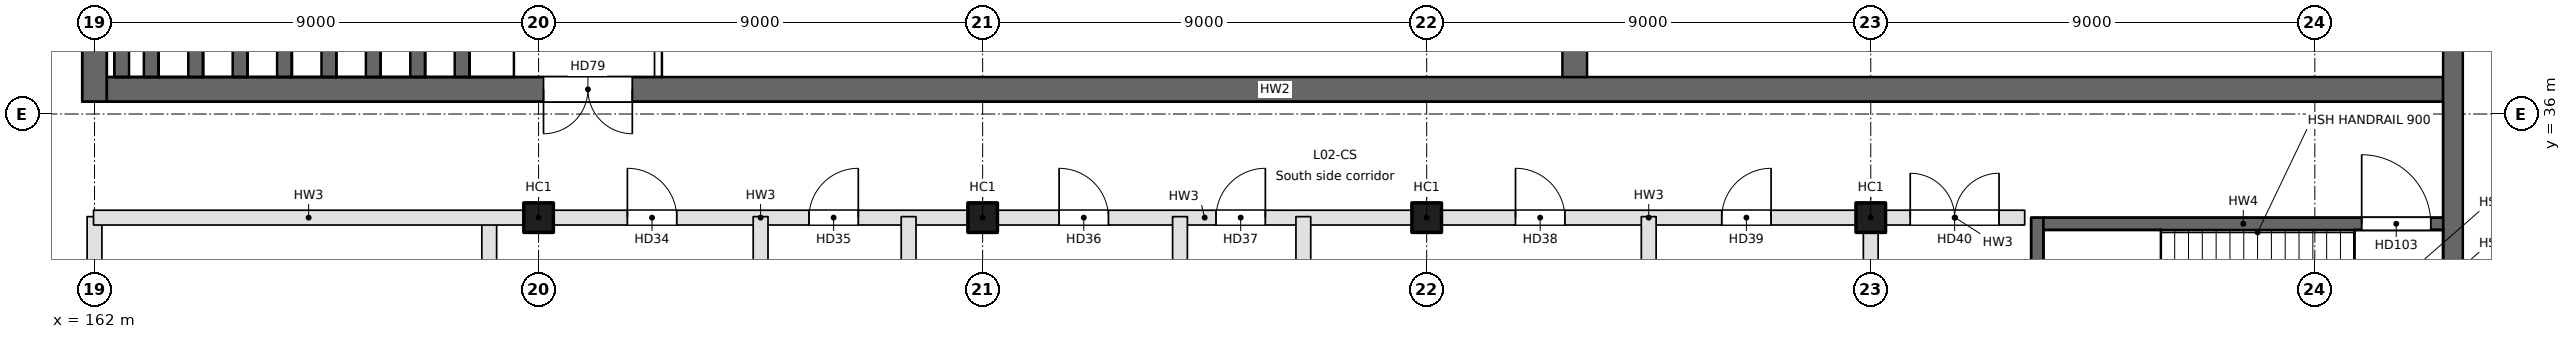
"""IFC4 building model, lengths in metres.
Left out: names, types, materials, properties, quantities, classifications, styles, units other than length and angle.
Written with IfcOpenShell. Run it as: python <this file> out.ifc"""

import sys

from ifc_helpers import new_model, si_unit, direction, frame, frame_2d, origin, origin_2d, place, context, subcontext, project, spatial, rectangle, extrude, element, fill, save


model = new_model("IFC4")
c1 = context("Model", 3, precision=1e-05, world=origin(), true_north=direction((0.0, 1.0)))
c2 = subcontext(c1, "Body", "Model", "MODEL_VIEW")
j1 = project(units=[si_unit("LENGTHUNIT", "METRE"), si_unit("PLANEANGLEUNIT", "RADIAN")], contexts=[c1])
p1 = place(None, origin())
s1 = spatial("IfcSite", under=j1, at=p1, CompositionType="ELEMENT")
p2 = place(p1, origin())
s2 = spatial("IfcBuilding", under=s1, at=p2, CompositionType="ELEMENT")
p3 = place(p2, frame((0.0, 0.0, 11.4)))
s3 = spatial("IfcBuildingStorey", under=s2, at=p3, CompositionType="ELEMENT", Elevation=11.4)
for number, where, z_axis, x_axis in (
    (1, (171.0, 33.9, 0.0), (0.0, 0.0, 1.0), (1.0, 0.0, 0.0)),
    (2, (180.0, 33.9, 0.0), (0.0, 0.0, 1.0), (1.0, 0.0, 0.0)),
    (3, (189.0, 33.9, 0.0), (0.0, 0.0, 1.0), (1.0, 0.0, 0.0)),
    (4, (198.0, 33.9, 0.0), (0.0, 0.0, 1.0), (1.0, 0.0, 0.0)),
):
    element("IfcColumn", number, at=place(p3, frame(where, z_axis=z_axis, x_axis=x_axis)), inside=s3, PredefinedType="COLUMN", context=c2, shape_type="SweptSolid", body=[
        extrude(rectangle(XDim=0.6, YDim=0.6, at=origin_2d()), origin(), (0.0, 0.0, 1.0), 5.4),
    ])
p4 = place(p3, frame((162.0, 36.25, -0.35), z_axis=(0.0, 0.0, 1.0), x_axis=(0.0, 1.0, 0.0)))
e5 = element("IfcWall", 5, at=p4, inside=s3, PredefinedType="SOLIDWALL", context=c2, shape_type="SweptSolid", body=[
    extrude(rectangle(XDim=26.5, YDim=0.5, at=frame_2d((13.25, 0.0))), origin(), (0.0, 0.0, 1.0), 5.4),
])
p5 = place(p3, frame((209.6, 36.5, -0.35), z_axis=(0.0, 0.0, 1.0), x_axis=(-1.0, 0.0, 0.0)))
e6 = element("IfcWall", 6, at=p5, inside=s3, PredefinedType="SOLIDWALL", context=c2, shape_type="SweptSolid", body=[
    extrude(rectangle(XDim=47.35, YDim=0.5, at=frame_2d((23.675, 0.0))), origin(), (0.0, 0.0, 1.0), 5.4),
])
p6 = place(p5, frame((36.7, 0.0, 0.35)))
e7 = element("IfcOpeningElement", 7, at=p6, cuts=e6, PredefinedType="OPENING", context=c2, shape_type="SweptSolid", body=[
    extrude(rectangle(XDim=1.8, YDim=2.4, at=frame_2d((0.9, 1.2))), frame((0.0, 0.25, 0.0), z_axis=(0.0, -1.0, 0.0), x_axis=(1.0, 0.0, 0.0)), (0.0, 0.0, 1.0), 0.5),
])
p7 = place(p3, frame((192.0, 36.75, -0.35), z_axis=(0.0, 0.0, 1.0), x_axis=(0.0, 1.0, 0.0)))
e8 = element("IfcWall", 8, at=p7, inside=s3, PredefinedType="SOLIDWALL", context=c2, shape_type="SweptSolid", body=[
    extrude(rectangle(XDim=5.75, YDim=0.5, at=frame_2d((2.875, 0.0))), origin(), (0.0, 0.0, 1.0), 5.4),
])
p8 = place(p3, frame((209.8, 76.5, -0.35), z_axis=(0.0, 0.0, 1.0), x_axis=(0.0, -1.0, 0.0)))
e9 = element("IfcWall", 9, at=p8, inside=s3, PredefinedType="SOLIDWALL", context=c2, shape_type="SweptSolid", body=[
    extrude(rectangle(XDim=54.0, YDim=0.4, at=frame_2d((27.0, 0.0))), origin(), (0.0, 0.0, 1.0), 5.4),
])
p9 = place(p8, frame((49.3, 0.0, 1.25)))
e10 = element("IfcOpeningElement", 10, at=p9, cuts=e9, PredefinedType="OPENING", context=c2, shape_type="SweptSolid", body=[
    extrude(rectangle(XDim=2.4, YDim=1.8, at=frame_2d((1.2, 0.9))), frame((0.0, 0.2, 0.0), z_axis=(0.0, -1.0, 0.0), x_axis=(1.0, 0.0, 0.0)), (0.0, 0.0, 1.0), 0.4),
])
p10 = place(p8, frame((2.3, 0.0, 1.25)))
e11 = element("IfcOpeningElement", 11, at=p10, cuts=e9, PredefinedType="OPENING", context=c2, shape_type="SweptSolid", body=[
    extrude(rectangle(XDim=2.4, YDim=1.8, at=frame_2d((1.2, 0.9))), frame((0.0, 0.2, 0.0), z_axis=(0.0, -1.0, 0.0), x_axis=(1.0, 0.0, 0.0)), (0.0, 0.0, 1.0), 0.4),
])
p11 = place(p3, frame((169.45, 36.75, 0.0), z_axis=(0.0, 0.0, 1.0), x_axis=(0.0, 1.0, 0.0)))
e12 = element("IfcWall", 12, at=p11, inside=s3, PredefinedType="SOLIDWALL", context=c2, shape_type="SweptSolid", body=[
    extrude(rectangle(XDim=25.5, YDim=0.3, at=frame_2d((12.75, 0.0))), origin(), (0.0, 0.0, 1.0), 0.2),
])
p12 = place(p3, frame((168.55, 36.75, 0.0), z_axis=(0.0, 0.0, 1.0), x_axis=(0.0, 1.0, 0.0)))
e13 = element("IfcWall", 13, at=p12, inside=s3, PredefinedType="SOLIDWALL", context=c2, shape_type="SweptSolid", body=[
    extrude(rectangle(XDim=25.5, YDim=0.3, at=frame_2d((12.75, 0.0))), origin(), (0.0, 0.0, 1.0), 0.4),
])
p13 = place(p3, frame((167.65, 36.75, 0.0), z_axis=(0.0, 0.0, 1.0), x_axis=(0.0, 1.0, 0.0)))
e14 = element("IfcWall", 14, at=p13, inside=s3, PredefinedType="SOLIDWALL", context=c2, shape_type="SweptSolid", body=[
    extrude(rectangle(XDim=25.5, YDim=0.3, at=frame_2d((12.75, 0.0))), origin(), (0.0, 0.0, 1.0), 0.6),
])
p14 = place(p3, frame((166.75, 36.75, 0.0), z_axis=(0.0, 0.0, 1.0), x_axis=(0.0, 1.0, 0.0)))
e15 = element("IfcWall", 15, at=p14, inside=s3, PredefinedType="SOLIDWALL", context=c2, shape_type="SweptSolid", body=[
    extrude(rectangle(XDim=25.5, YDim=0.3, at=frame_2d((12.75, 0.0))), origin(), (0.0, 0.0, 1.0), 0.8),
])
p15 = place(p3, frame((165.85, 36.75, 0.0), z_axis=(0.0, 0.0, 1.0), x_axis=(0.0, 1.0, 0.0)))
e16 = element("IfcWall", 16, at=p15, inside=s3, PredefinedType="SOLIDWALL", context=c2, shape_type="SweptSolid", body=[
    extrude(rectangle(XDim=25.5, YDim=0.3, at=frame_2d((12.75, 0.0))), origin(), (0.0, 0.0, 1.0), 1.0),
])
p16 = place(p3, frame((164.95, 36.75, 0.0), z_axis=(0.0, 0.0, 1.0), x_axis=(0.0, 1.0, 0.0)))
e17 = element("IfcWall", 17, at=p16, inside=s3, PredefinedType="SOLIDWALL", context=c2, shape_type="SweptSolid", body=[
    extrude(rectangle(XDim=25.5, YDim=0.3, at=frame_2d((12.75, 0.0))), origin(), (0.0, 0.0, 1.0), 1.2),
])
p17 = place(p3, frame((164.05, 36.75, 0.0), z_axis=(0.0, 0.0, 1.0), x_axis=(0.0, 1.0, 0.0)))
e18 = element("IfcWall", 18, at=p17, inside=s3, PredefinedType="SOLIDWALL", context=c2, shape_type="SweptSolid", body=[
    extrude(rectangle(XDim=25.5, YDim=0.3, at=frame_2d((12.75, 0.0))), origin(), (0.0, 0.0, 1.0), 1.4),
])
for number, where, z_axis, x_axis in (
    (19, (163.15, 36.75, 0.0), (0.0, 0.0, 1.0), (0.0, 1.0, 0.0)),
    (20, (162.55, 36.75, 0.0), (0.0, 0.0, 1.0), (0.0, 1.0, 0.0)),
):
    element("IfcWall", number, at=place(p3, frame(where, z_axis=z_axis, x_axis=x_axis)), inside=s3, PredefinedType="SOLIDWALL", context=c2, shape_type="SweptSolid", body=[
        extrude(rectangle(XDim=25.5, YDim=0.3, at=frame_2d((12.75, 0.0))), origin(), (0.0, 0.0, 1.0), 1.6),
    ])
p18 = place(p3, frame((162.0, 22.73, 0.0), z_axis=(0.0, 0.0, 1.0), x_axis=(0.0, 1.0, 0.0)))
e21 = element("IfcWall", 21, at=p18, inside=s3, PredefinedType="PARTITIONING", context=c2, shape_type="SweptSolid", body=[
    extrude(rectangle(XDim=11.19, YDim=0.3, at=frame_2d((5.595, 0.0))), origin(), (0.0, 0.0, 1.0), 5.05),
])
p19 = place(p18, frame((4.75, 0.0, 0.0)))
e22 = element("IfcOpeningElement", 22, at=p19, cuts=e21, PredefinedType="OPENING", context=c2, shape_type="SweptSolid", body=[
    extrude(rectangle(XDim=1.8, YDim=2.1, at=frame_2d((0.9, 1.05))), frame((0.0, 0.15, 0.0), z_axis=(0.0, -1.0, 0.0), x_axis=(1.0, 0.0, 0.0)), (0.0, 0.0, 1.0), 0.3),
])
p20 = place(p3, frame((170.0, 22.73, 0.0), z_axis=(0.0, 0.0, 1.0), x_axis=(0.0, 1.0, 0.0)))
e23 = element("IfcWall", 23, at=p20, inside=s3, PredefinedType="PARTITIONING", context=c2, shape_type="SweptSolid", body=[
    extrude(rectangle(XDim=11.19, YDim=0.3, at=frame_2d((5.595, 0.0))), origin(), (0.0, 0.0, 1.0), 5.05),
])
p21 = place(p3, frame((161.98, 33.9, 0.0), z_axis=(0.0, 0.0, 1.0), x_axis=(1.0, 0.0, 0.0)))
e24 = element("IfcWall", 24, at=p21, inside=s3, PredefinedType="PARTITIONING", context=c2, shape_type="SweptSolid", body=[
    extrude(rectangle(XDim=8.72, YDim=0.3, at=frame_2d((4.36, 0.0))), origin(), (0.0, 0.0, 1.0), 5.05),
])
p22 = place(p3, frame((171.3, 33.9, 0.0), z_axis=(0.0, 0.0, 1.0), x_axis=(1.0, 0.0, 0.0)))
e25 = element("IfcWall", 25, at=p22, inside=s3, PredefinedType="PARTITIONING", context=c2, shape_type="SweptSolid", body=[
    extrude(rectangle(XDim=8.4, YDim=0.3, at=frame_2d((4.2, 0.0))), origin(), (0.0, 0.0, 1.0), 5.05),
])
p23 = place(p22, frame((1.5, 0.0, 0.0)))
e26 = element("IfcOpeningElement", 26, at=p23, cuts=e25, PredefinedType="OPENING", context=c2, shape_type="SweptSolid", body=[
    extrude(rectangle(XDim=1.0, YDim=2.1, at=frame_2d((0.5, 1.05))), frame((0.0, 0.15, 0.0), z_axis=(0.0, -1.0, 0.0), x_axis=(1.0, 0.0, 0.0)), (0.0, 0.0, 1.0), 0.3),
])
p24 = place(p22, frame((5.18, 0.0, 0.0)))
e27 = element("IfcOpeningElement", 27, at=p24, cuts=e25, PredefinedType="OPENING", context=c2, shape_type="SweptSolid", body=[
    extrude(rectangle(XDim=1.0, YDim=2.1, at=frame_2d((0.5, 1.05))), frame((0.0, 0.15, 0.0), z_axis=(0.0, -1.0, 0.0), x_axis=(1.0, 0.0, 0.0)), (0.0, 0.0, 1.0), 0.3),
])
p25 = place(p3, frame((180.3, 33.9, 0.0), z_axis=(0.0, 0.0, 1.0), x_axis=(1.0, 0.0, 0.0)))
e28 = element("IfcWall", 28, at=p25, inside=s3, PredefinedType="PARTITIONING", context=c2, shape_type="SweptSolid", body=[
    extrude(rectangle(XDim=8.4, YDim=0.3, at=frame_2d((4.2, 0.0))), origin(), (0.0, 0.0, 1.0), 5.05),
])
p26 = place(p25, frame((1.25, 0.0, 0.0)))
e29 = element("IfcOpeningElement", 29, at=p26, cuts=e28, PredefinedType="OPENING", context=c2, shape_type="SweptSolid", body=[
    extrude(rectangle(XDim=1.0, YDim=2.1, at=frame_2d((0.5, 1.05))), frame((0.0, 0.15, 0.0), z_axis=(0.0, -1.0, 0.0), x_axis=(1.0, 0.0, 0.0)), (0.0, 0.0, 1.0), 0.3),
])
p27 = place(p25, frame((4.43, 0.0, 0.0)))
e30 = element("IfcOpeningElement", 30, at=p27, cuts=e28, PredefinedType="OPENING", context=c2, shape_type="SweptSolid", body=[
    extrude(rectangle(XDim=1.0, YDim=2.1, at=frame_2d((0.5, 1.05))), frame((0.0, 0.15, 0.0), z_axis=(0.0, -1.0, 0.0), x_axis=(1.0, 0.0, 0.0)), (0.0, 0.0, 1.0), 0.3),
])
p28 = place(p3, frame((189.3, 33.9, 0.0), z_axis=(0.0, 0.0, 1.0), x_axis=(1.0, 0.0, 0.0)))
e31 = element("IfcWall", 31, at=p28, inside=s3, PredefinedType="PARTITIONING", context=c2, shape_type="SweptSolid", body=[
    extrude(rectangle(XDim=8.4, YDim=0.3, at=frame_2d((4.2, 0.0))), origin(), (0.0, 0.0, 1.0), 5.05),
])
p29 = place(p28, frame((1.5, 0.0, 0.0)))
e32 = element("IfcOpeningElement", 32, at=p29, cuts=e31, PredefinedType="OPENING", context=c2, shape_type="SweptSolid", body=[
    extrude(rectangle(XDim=1.0, YDim=2.1, at=frame_2d((0.5, 1.05))), frame((0.0, 0.15, 0.0), z_axis=(0.0, -1.0, 0.0), x_axis=(1.0, 0.0, 0.0)), (0.0, 0.0, 1.0), 0.3),
])
p30 = place(p28, frame((5.68, 0.0, 0.0)))
e33 = element("IfcOpeningElement", 33, at=p30, cuts=e31, PredefinedType="OPENING", context=c2, shape_type="SweptSolid", body=[
    extrude(rectangle(XDim=1.0, YDim=2.1, at=frame_2d((0.5, 1.05))), frame((0.0, 0.15, 0.0), z_axis=(0.0, -1.0, 0.0), x_axis=(1.0, 0.0, 0.0)), (0.0, 0.0, 1.0), 0.3),
])
p31 = place(p3, frame((198.3, 33.9, 0.0), z_axis=(0.0, 0.0, 1.0), x_axis=(1.0, 0.0, 0.0)))
e34 = element("IfcWall", 34, at=p31, inside=s3, PredefinedType="PARTITIONING", context=c2, shape_type="SweptSolid", body=[
    extrude(rectangle(XDim=2.82, YDim=0.3, at=frame_2d((1.41, 0.0))), origin(), (0.0, 0.0, 1.0), 5.05),
])
p32 = place(p31, frame((0.5, 0.0, 0.0)))
e35 = element("IfcOpeningElement", 35, at=p32, cuts=e34, PredefinedType="OPENING", context=c2, shape_type="SweptSolid", body=[
    extrude(rectangle(XDim=1.8, YDim=2.1, at=frame_2d((0.9, 1.05))), frame((0.0, 0.15, 0.0), z_axis=(0.0, -1.0, 0.0), x_axis=(1.0, 0.0, 0.0)), (0.0, 0.0, 1.0), 0.3),
])
for number, where, z_axis, x_axis in (
    (36, (175.5, 22.73, 0.0), (0.0, 0.0, 1.0), (0.0, 1.0, 0.0)),
    (37, (178.5, 22.73, 0.0), (0.0, 0.0, 1.0), (0.0, 1.0, 0.0)),
    (38, (184.0, 22.73, 0.0), (0.0, 0.0, 1.0), (0.0, 1.0, 0.0)),
    (39, (186.5, 22.73, 0.0), (0.0, 0.0, 1.0), (0.0, 1.0, 0.0)),
    (40, (193.5, 22.73, 0.0), (0.0, 0.0, 1.0), (0.0, 1.0, 0.0)),
):
    element("IfcWall", number, at=place(p3, frame(where, z_axis=z_axis, x_axis=x_axis)), inside=s3, PredefinedType="PARTITIONING", context=c2, shape_type="SweptSolid", body=[
        extrude(rectangle(XDim=11.19, YDim=0.3, at=frame_2d((5.595, 0.0))), origin(), (0.0, 0.0, 1.0), 5.05),
    ])
p33 = place(p3, frame((198.0, 22.73, 0.0), z_axis=(0.0, 0.0, 1.0), x_axis=(0.0, 1.0, 0.0)))
e41 = element("IfcWall", 41, at=p33, inside=s3, PredefinedType="PARTITIONING", context=c2, shape_type="SweptSolid", body=[
    extrude(rectangle(XDim=10.87, YDim=0.3, at=frame_2d((5.435, 0.0))), origin(), (0.0, 0.0, 1.0), 5.05),
])
p34 = place(p3, frame((201.375, 29.65, -0.35), z_axis=(0.0, 0.0, 1.0), x_axis=(0.0, 1.0, 0.0)))
e42 = element("IfcWall", 42, at=p34, inside=s3, PredefinedType="SOLIDWALL", context=c2, shape_type="SweptSolid", body=[
    extrude(rectangle(XDim=4.25, YDim=0.25, at=frame_2d((2.125, 0.0))), origin(), (0.0, 0.0, 1.0), 5.4),
])
p35 = place(p3, frame((201.5, 33.775, -0.35), z_axis=(0.0, 0.0, 1.0), x_axis=(1.0, 0.0, 0.0)))
e43 = element("IfcWall", 43, at=p35, inside=s3, PredefinedType="SOLIDWALL", context=c2, shape_type="SweptSolid", body=[
    extrude(rectangle(XDim=8.1, YDim=0.25, at=frame_2d((4.05, 0.0))), origin(), (0.0, 0.0, 1.0), 5.4),
])
p36 = place(p35, frame((6.45, 0.0, 0.35)))
e44 = element("IfcOpeningElement", 44, at=p36, cuts=e43, PredefinedType="OPENING", context=c2, shape_type="SweptSolid", body=[
    extrude(rectangle(XDim=1.4, YDim=2.1, at=frame_2d((0.7, 1.05))), frame((0.0, 0.125, 0.0), z_axis=(0.0, -1.0, 0.0), x_axis=(1.0, 0.0, 0.0)), (0.0, 0.0, 1.0), 0.25),
])
p37 = place(p23, origin())
e45 = element("IfcDoor", 45, at=p37, inside=s3, OperationType="SINGLE_SWING_LEFT", PredefinedType="DOOR", context=c2, shape_type="SweptSolid", body=[
    extrude(rectangle(XDim=1.0, YDim=2.1, at=frame_2d((0.5, 1.05))), frame((0.0, 0.025, 0.0), z_axis=(0.0, -1.0, 0.0), x_axis=(1.0, 0.0, 0.0)), (0.0, 0.0, 1.0), 0.05),
])
fill(e26, e45)
p38 = place(p24, origin())
e46 = element("IfcDoor", 46, at=p38, inside=s3, OperationType="SINGLE_SWING_RIGHT", PredefinedType="DOOR", context=c2, shape_type="SweptSolid", body=[
    extrude(rectangle(XDim=1.0, YDim=2.1, at=frame_2d((0.5, 1.05))), frame((0.0, 0.025, 0.0), z_axis=(0.0, -1.0, 0.0), x_axis=(1.0, 0.0, 0.0)), (0.0, 0.0, 1.0), 0.05),
])
fill(e27, e46)
p39 = place(p26, origin())
e47 = element("IfcDoor", 47, at=p39, inside=s3, OperationType="SINGLE_SWING_LEFT", PredefinedType="DOOR", context=c2, shape_type="SweptSolid", body=[
    extrude(rectangle(XDim=1.0, YDim=2.1, at=frame_2d((0.5, 1.05))), frame((0.0, 0.025, 0.0), z_axis=(0.0, -1.0, 0.0), x_axis=(1.0, 0.0, 0.0)), (0.0, 0.0, 1.0), 0.05),
])
fill(e29, e47)
p40 = place(p27, origin())
e48 = element("IfcDoor", 48, at=p40, inside=s3, OperationType="SINGLE_SWING_RIGHT", PredefinedType="DOOR", context=c2, shape_type="SweptSolid", body=[
    extrude(rectangle(XDim=1.0, YDim=2.1, at=frame_2d((0.5, 1.05))), frame((0.0, 0.025, 0.0), z_axis=(0.0, -1.0, 0.0), x_axis=(1.0, 0.0, 0.0)), (0.0, 0.0, 1.0), 0.05),
])
fill(e30, e48)
p41 = place(p29, origin())
e49 = element("IfcDoor", 49, at=p41, inside=s3, OperationType="SINGLE_SWING_LEFT", PredefinedType="DOOR", context=c2, shape_type="SweptSolid", body=[
    extrude(rectangle(XDim=1.0, YDim=2.1, at=frame_2d((0.5, 1.05))), frame((0.0, 0.025, 0.0), z_axis=(0.0, -1.0, 0.0), x_axis=(1.0, 0.0, 0.0)), (0.0, 0.0, 1.0), 0.05),
])
fill(e32, e49)
p42 = place(p30, origin())
e50 = element("IfcDoor", 50, at=p42, inside=s3, OperationType="SINGLE_SWING_RIGHT", PredefinedType="DOOR", context=c2, shape_type="SweptSolid", body=[
    extrude(rectangle(XDim=1.0, YDim=2.1, at=frame_2d((0.5, 1.05))), frame((0.0, 0.025, 0.0), z_axis=(0.0, -1.0, 0.0), x_axis=(1.0, 0.0, 0.0)), (0.0, 0.0, 1.0), 0.05),
])
fill(e33, e50)
p43 = place(p32, origin())
e51 = element("IfcDoor", 51, at=p43, inside=s3, OperationType="DOUBLE_DOOR_SINGLE_SWING", PredefinedType="DOOR", context=c2, shape_type="SweptSolid", body=[
    extrude(rectangle(XDim=1.8, YDim=2.1, at=frame_2d((0.9, 1.05))), frame((0.0, 0.025, 0.0), z_axis=(0.0, -1.0, 0.0), x_axis=(1.0, 0.0, 0.0)), (0.0, 0.0, 1.0), 0.05),
])
fill(e35, e51)
p44 = place(p6, origin())
e52 = element("IfcDoor", 52, at=p44, inside=s3, OperationType="DOUBLE_DOOR_SINGLE_SWING", PredefinedType="DOOR", context=c2, shape_type="SweptSolid", body=[
    extrude(rectangle(XDim=1.8, YDim=2.4, at=frame_2d((0.9, 1.2))), frame((0.0, 0.025, 0.0), z_axis=(0.0, -1.0, 0.0), x_axis=(1.0, 0.0, 0.0)), (0.0, 0.0, 1.0), 0.05),
])
fill(e7, e52)
p45 = place(p36, origin())
e53 = element("IfcDoor", 53, at=p45, inside=s3, OperationType="SINGLE_SWING_LEFT", PredefinedType="DOOR", context=c2, shape_type="SweptSolid", body=[
    extrude(rectangle(XDim=1.4, YDim=2.1, at=frame_2d((0.7, 1.05))), frame((0.0, 0.025, 0.0), z_axis=(0.0, -1.0, 0.0), x_axis=(1.0, 0.0, 0.0)), (0.0, 0.0, 1.0), 0.05),
])
fill(e44, e53)
save(model, sys.argv[1])
